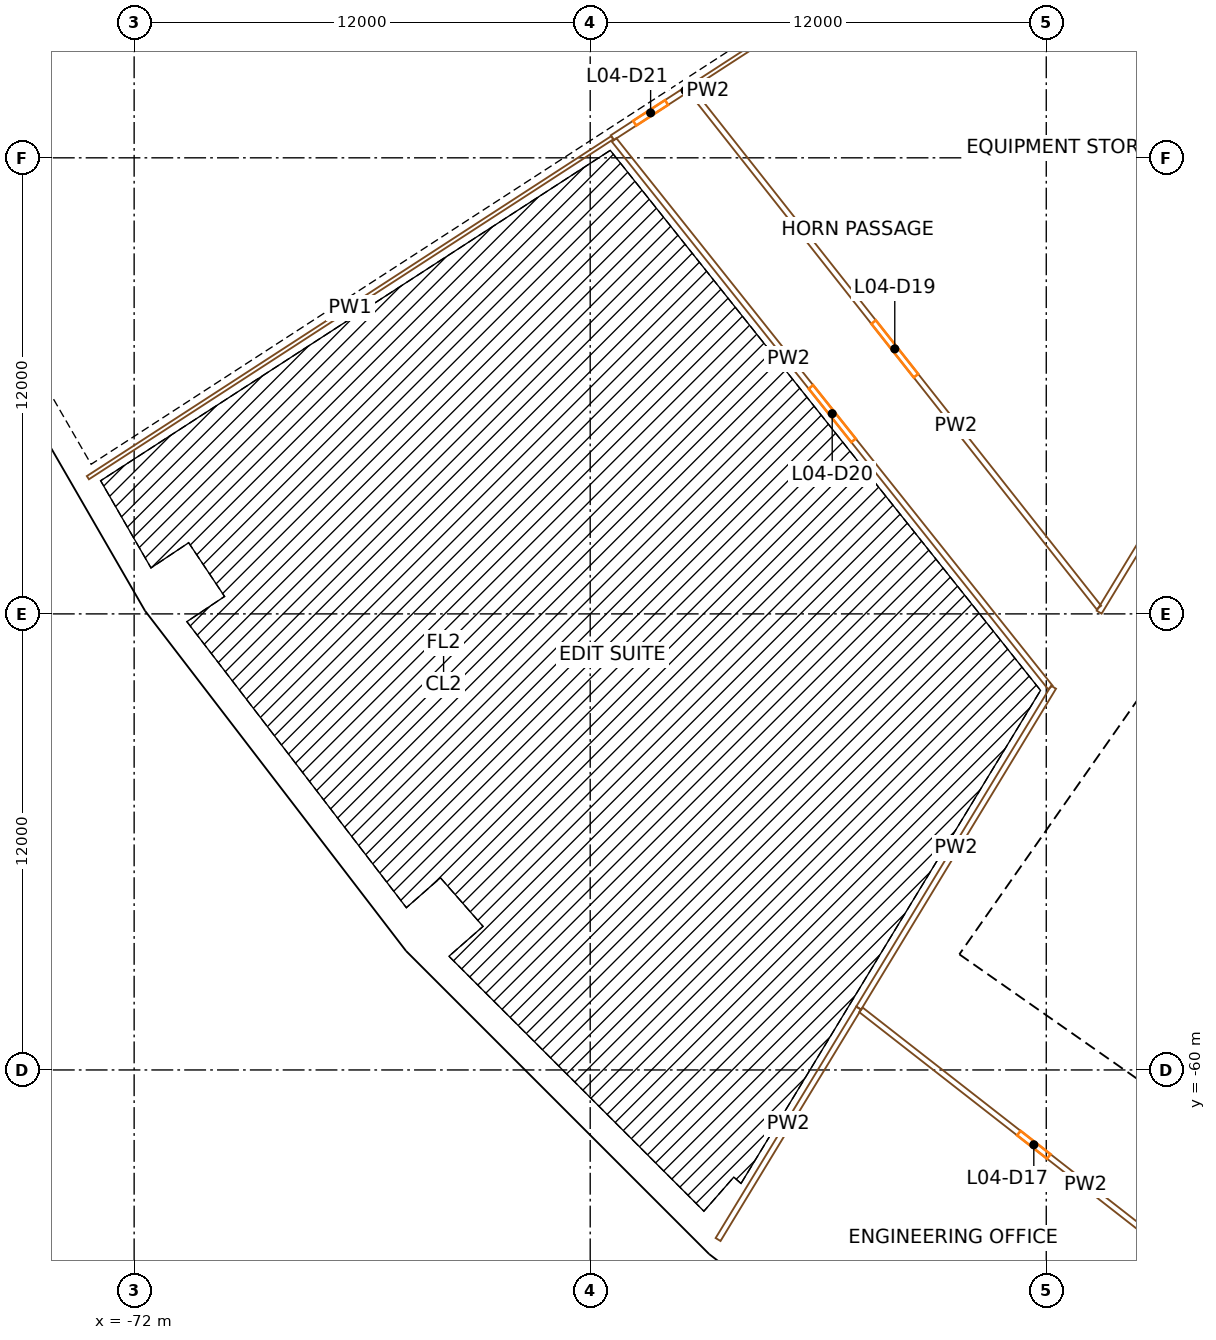
"""IFC4 building model, lengths in metres.
Left out: names, types, materials, properties, quantities, classifications, styles, units other than length and angle.
Written with IfcOpenShell. Run it as: python <this file> out.ifc"""

import sys

from ifc_helpers import new_model, si_unit, direction, frame, frame_2d, origin, origin_2d, place, context, subcontext, project, spatial, rectangle, extrude, element, fill, save


model = new_model("IFC4")
c1 = context("Model", 3, precision=1e-05, world=origin(), true_north=direction((0.0, 1.0)))
c2 = subcontext(c1, "Body", "Model", "MODEL_VIEW")
j1 = project(units=[si_unit("LENGTHUNIT", "METRE"), si_unit("PLANEANGLEUNIT", "RADIAN")], contexts=[c1])
p1 = place(None, origin())
s1 = spatial("IfcSite", under=j1, at=p1, CompositionType="ELEMENT")
p2 = place(p1, origin())
s2 = spatial("IfcBuilding", under=s1, at=p2, CompositionType="ELEMENT")
p3 = place(p2, frame((0.0, 0.0, 31.5)))
s3 = spatial("IfcBuildingStorey", under=s2, at=p3, CompositionType="ELEMENT", Elevation=31.5)
for number, where, z_axis, x_axis in (
    (1, (-69.732, -34.388, 0.0), (0.0, 0.0, 1.0), (0.442, -0.897, 0.0)),
    (2, (-48.433, -32.362, 0.0), (0.0, 0.0, 1.0), (0.556, -0.831, 0.0)),
    (3, (-64.647, -43.196, 0.0), (0.0, 0.0, 1.0), (0.556, -0.831, 0.0)),
):
    element("IfcColumn", number, at=place(p3, frame(where, z_axis=z_axis, x_axis=x_axis)), inside=s3, PredefinedType="COLUMN", context=c2, shape_type="SweptSolid", body=[
        extrude(rectangle(XDim=1.4, YDim=1.8, at=origin_2d()), origin(), (0.0, 0.0, 1.0), 4.5),
    ])
p4 = place(p3, frame((-70.883, -47.362, 0.0), z_axis=(0.0, 0.0, 1.0), x_axis=(0.55557023302, -0.831469612303, 0.0)))
e4 = element("IfcColumn", 4, at=p4, inside=s3, PredefinedType="COLUMN", context=c2, shape_type="SweptSolid", body=[
    extrude(rectangle(XDim=1.1, YDim=1.3, at=origin_2d()), origin(), (0.0, 0.0, 1.0), 4.5),
])
p5 = place(p3, frame((-58.456, -51.264, 0.0), z_axis=(0.0, 0.0, 1.0), x_axis=(0.6593458151, -0.751839807479, 0.0)))
e5 = element("IfcColumn", 5, at=p5, inside=s3, PredefinedType="COLUMN", context=c2, shape_type="SweptSolid", body=[
    extrude(rectangle(XDim=1.4, YDim=1.8, at=origin_2d()), origin(), (0.0, 0.0, 1.0), 4.5),
])
p6 = place(p3, frame((-64.094, -56.209, 0.0), z_axis=(0.0, 0.0, 1.0), x_axis=(0.6593458151, -0.751839807479, 0.0)))
e6 = element("IfcColumn", 6, at=p6, inside=s3, PredefinedType="COLUMN", context=c2, shape_type="SweptSolid", body=[
    extrude(rectangle(XDim=1.1, YDim=1.3, at=origin_2d()), origin(), (0.0, 0.0, 1.0), 4.5),
])
p7 = place(p3, frame((-51.264, -58.456, 0.0), z_axis=(0.0, 0.0, 1.0), x_axis=(0.751839807479, -0.6593458151, 0.0)))
e7 = element("IfcColumn", 7, at=p7, inside=s3, PredefinedType="COLUMN", context=c2, shape_type="SweptSolid", body=[
    extrude(rectangle(XDim=1.4, YDim=1.8, at=origin_2d()), origin(), (0.0, 0.0, 1.0), 4.5),
])
p8 = place(p3, frame((-56.209, -64.094, 0.0), z_axis=(0.0, 0.0, 1.0), x_axis=(0.751839807479, -0.6593458151, 0.0)))
e8 = element("IfcColumn", 8, at=p8, inside=s3, PredefinedType="COLUMN", context=c2, shape_type="SweptSolid", body=[
    extrude(rectangle(XDim=1.1, YDim=1.3, at=origin_2d()), origin(), (0.0, 0.0, 1.0), 4.5),
])
p9 = place(p3, frame((-49.779, -57.191, 0.0), z_axis=(0.0, 0.0, 1.0), x_axis=(0.573577477574, 0.819151315216, 0.0)))
e9 = element("IfcWall", 9, at=p9, inside=s3, PredefinedType="SHEAR", context=c2, shape_type="SweptSolid", body=[
    extrude(rectangle(XDim=14.8, YDim=0.9, at=frame_2d((7.4, 0.0))), origin(), (0.0, 0.0, 1.0), 4.1),
])
p10 = place(p9, frame((6.7, 0.0, 0.0)))
e10 = element("IfcOpeningElement", 10, at=p10, cuts=e9, PredefinedType="OPENING", context=c2, shape_type="SweptSolid", body=[
    extrude(rectangle(XDim=1.4, YDim=2.1, at=frame_2d((0.7, 1.05))), frame((0.0, 0.46, 0.0), z_axis=(0.0, -1.0, 0.0), x_axis=(1.0, 0.0, 0.0)), (0.0, 0.0, 1.0), 0.92),
])
p11 = place(p3, frame((-36.827, -65.71, 0.0), z_axis=(0.0, 0.0, 1.0), x_axis=(-0.819153391756, 0.573574511963, 0.0)))
e11 = element("IfcWall", 11, at=p11, inside=s3, PredefinedType="SHEAR", context=c2, shape_type="SweptSolid", body=[
    extrude(rectangle(XDim=15.045, YDim=0.9, at=frame_2d((7.523, 0.0))), origin(), (0.0, 0.0, 1.0), 4.1),
])
p12 = place(p11, frame((0.6, 0.0, 0.0)))
e12 = element("IfcOpeningElement", 12, at=p12, cuts=e11, PredefinedType="OPENING", context=c2, shape_type="SweptSolid", body=[
    extrude(rectangle(XDim=1.0, YDim=2.1, at=frame_2d((0.5, 1.05))), frame((0.0, 0.46, 0.0), z_axis=(0.0, -1.0, 0.0), x_axis=(1.0, 0.0, 0.0)), (0.0, 0.0, 1.0), 0.92),
])
p13 = place(p11, frame((3.275, 0.0, 0.0)))
e13 = element("IfcOpeningElement", 13, at=p13, cuts=e11, PredefinedType="OPENING", context=c2, shape_type="SweptSolid", body=[
    extrude(rectangle(XDim=1.0, YDim=2.1, at=frame_2d((0.5, 1.05))), frame((0.0, 0.46, 0.0), z_axis=(0.0, -1.0, 0.0), x_axis=(1.0, 0.0, 0.0)), (0.0, 0.0, 1.0), 0.92),
])
p14 = place(p11, frame((6.175, 0.0, 0.0)))
e14 = element("IfcOpeningElement", 14, at=p14, cuts=e11, PredefinedType="OPENING", context=c2, shape_type="SweptSolid", body=[
    extrude(rectangle(XDim=1.0, YDim=2.1, at=frame_2d((0.5, 1.05))), frame((0.0, 0.46, 0.0), z_axis=(0.0, -1.0, 0.0), x_axis=(1.0, 0.0, 0.0)), (0.0, 0.0, 1.0), 0.92),
])
p15 = place(p11, frame((13.495, 0.0, 0.0)))
e15 = element("IfcOpeningElement", 15, at=p15, cuts=e11, PredefinedType="OPENING", context=c2, shape_type="SweptSolid", body=[
    extrude(rectangle(XDim=1.1, YDim=2.1, at=frame_2d((0.55, 1.05))), frame((0.0, 0.46, 0.0), z_axis=(0.0, -1.0, 0.0), x_axis=(1.0, 0.0, 0.0)), (0.0, 0.0, 1.0), 0.92),
])
p16 = place(p3, frame((-41.262, -57.661, 0.0), z_axis=(0.0, 0.0, 1.0), x_axis=(-0.819164398642, 0.573558792102, 0.0)))
e16 = element("IfcWall", 16, at=p16, inside=s3, PredefinedType="SOLIDWALL", context=c2, shape_type="SweptSolid", body=[
    extrude(rectangle(XDim=6.795, YDim=0.3, at=frame_2d((3.397, 0.0))), origin(), (0.0, 0.0, 1.0), 4.1),
])
p17 = place(p16, frame((5.32, 0.0, 0.0)))
e17 = element("IfcOpeningElement", 17, at=p17, cuts=e16, PredefinedType="OPENING", context=c2, shape_type="SweptSolid", body=[
    extrude(rectangle(XDim=1.1, YDim=2.1, at=frame_2d((0.55, 1.05))), frame((0.0, 0.16, 0.0), z_axis=(0.0, -1.0, 0.0), x_axis=(1.0, 0.0, 0.0)), (0.0, 0.0, 1.0), 0.32),
])
p18 = place(p3, frame((-77.168, -38.022, 0.0), z_axis=(0.0, 0.0, 1.0), x_axis=(0.500001430823, -0.866024577697, 0.0)))
e18 = element("IfcWall", 18, at=p18, inside=s3, PredefinedType="SOLIDWALL", context=c2, shape_type="SweptSolid", body=[
    extrude(rectangle(XDim=11.312, YDim=0.45, at=frame_2d((5.656, 0.0))), origin(), (0.0, 0.0, 1.0), 3.2),
])
p19 = place(p18, frame((4.006, 0.0, 0.9)))
e19 = element("IfcOpeningElement", 19, at=p19, cuts=e18, PredefinedType="OPENING", context=c2, shape_type="SweptSolid", body=[
    extrude(rectangle(XDim=1.2, YDim=2.15, at=frame_2d((0.6, 1.075))), frame((0.0, 0.235, 0.0), z_axis=(0.0, -1.0, 0.0), x_axis=(1.0, 0.0, 0.0)), (0.0, 0.0, 1.0), 0.47),
])
p20 = place(p18, frame((6.106, 0.0, 0.9)))
e20 = element("IfcOpeningElement", 20, at=p20, cuts=e18, PredefinedType="OPENING", context=c2, shape_type="SweptSolid", body=[
    extrude(rectangle(XDim=1.2, YDim=2.15, at=frame_2d((0.6, 1.075))), frame((0.0, 0.235, 0.0), z_axis=(0.0, -1.0, 0.0), x_axis=(1.0, 0.0, 0.0)), (0.0, 0.0, 1.0), 0.47),
])
p21 = place(p3, frame((-71.491, -47.839, 0.0), z_axis=(0.0, 0.0, 1.0), x_axis=(0.608758773695, -0.793355377778, 0.0)))
e21 = element("IfcWall", 21, at=p21, inside=s3, PredefinedType="SOLIDWALL", context=c2, shape_type="SweptSolid", body=[
    extrude(rectangle(XDim=11.135, YDim=0.45, at=frame_2d((5.567, 0.0))), origin(), (0.0, 0.0, 1.0), 3.2),
])
p22 = place(p21, frame((3.917, 0.0, 0.9)))
e22 = element("IfcOpeningElement", 22, at=p22, cuts=e21, PredefinedType="OPENING", context=c2, shape_type="SweptSolid", body=[
    extrude(rectangle(XDim=1.2, YDim=2.15, at=frame_2d((0.6, 1.075))), frame((0.0, 0.235, 0.0), z_axis=(0.0, -1.0, 0.0), x_axis=(1.0, 0.0, 0.0)), (0.0, 0.0, 1.0), 0.47),
])
p23 = place(p21, frame((6.017, 0.0, 0.9)))
e23 = element("IfcOpeningElement", 23, at=p23, cuts=e21, PredefinedType="OPENING", context=c2, shape_type="SweptSolid", body=[
    extrude(rectangle(XDim=1.2, YDim=2.15, at=frame_2d((0.6, 1.075))), frame((0.0, 0.235, 0.0), z_axis=(0.0, -1.0, 0.0), x_axis=(1.0, 0.0, 0.0)), (0.0, 0.0, 1.0), 0.47),
])
p24 = place(p3, frame((-64.698, -56.699, 0.0), z_axis=(0.0, 0.0, 1.0), x_axis=(0.707106781187, -0.707106781187, 0.0)))
e24 = element("IfcWall", 24, at=p24, inside=s3, PredefinedType="SOLIDWALL", context=c2, shape_type="SweptSolid", body=[
    extrude(rectangle(XDim=11.312, YDim=0.45, at=frame_2d((5.656, 0.0))), origin(), (0.0, 0.0, 1.0), 3.2),
])
p25 = place(p24, frame((4.006, 0.0, 0.9)))
e25 = element("IfcOpeningElement", 25, at=p25, cuts=e24, PredefinedType="OPENING", context=c2, shape_type="SweptSolid", body=[
    extrude(rectangle(XDim=1.2, YDim=2.15, at=frame_2d((0.6, 1.075))), frame((0.0, 0.235, 0.0), z_axis=(0.0, -1.0, 0.0), x_axis=(1.0, 0.0, 0.0)), (0.0, 0.0, 1.0), 0.47),
])
p26 = place(p24, frame((6.106, 0.0, 0.9)))
e26 = element("IfcOpeningElement", 26, at=p26, cuts=e24, PredefinedType="OPENING", context=c2, shape_type="SweptSolid", body=[
    extrude(rectangle(XDim=1.2, YDim=2.15, at=frame_2d((0.6, 1.075))), frame((0.0, 0.235, 0.0), z_axis=(0.0, -1.0, 0.0), x_axis=(1.0, 0.0, 0.0)), (0.0, 0.0, 1.0), 0.47),
])
p27 = place(p3, frame((-56.673, -64.713, 0.0), z_axis=(0.0, 0.0, 1.0), x_axis=(0.793355377778, -0.608758773695, 0.0)))
e27 = element("IfcWall", 27, at=p27, inside=s3, PredefinedType="SOLIDWALL", context=c2, shape_type="SweptSolid", body=[
    extrude(rectangle(XDim=11.135, YDim=0.45, at=frame_2d((5.567, 0.0))), origin(), (0.0, 0.0, 1.0), 3.2),
])
p28 = place(p27, frame((3.917, 0.0, 0.9)))
e28 = element("IfcOpeningElement", 28, at=p28, cuts=e27, PredefinedType="OPENING", context=c2, shape_type="SweptSolid", body=[
    extrude(rectangle(XDim=1.2, YDim=2.15, at=frame_2d((0.6, 1.075))), frame((0.0, 0.235, 0.0), z_axis=(0.0, -1.0, 0.0), x_axis=(1.0, 0.0, 0.0)), (0.0, 0.0, 1.0), 0.47),
])
p29 = place(p27, frame((6.017, 0.0, 0.9)))
e29 = element("IfcOpeningElement", 29, at=p29, cuts=e27, PredefinedType="OPENING", context=c2, shape_type="SweptSolid", body=[
    extrude(rectangle(XDim=1.2, YDim=2.15, at=frame_2d((0.6, 1.075))), frame((0.0, 0.235, 0.0), z_axis=(0.0, -1.0, 0.0), x_axis=(1.0, 0.0, 0.0)), (0.0, 0.0, 1.0), 0.47),
])
p30 = place(p3, frame((-73.217, -44.416, 0.0), z_axis=(0.0, 0.0, 1.0), x_axis=(0.839098650594, 0.543979277703, 0.0)))
e30 = element("IfcWall", 30, at=p30, inside=s3, PredefinedType="PARTITIONING", context=c2, shape_type="SweptSolid", body=[
    extrude(rectangle(XDim=16.445, YDim=0.1, at=frame_2d((8.223, 0.0))), origin(), (0.0, 0.0, 1.0), 3.1),
])
p31 = place(p3, frame((-59.418, -35.47, 0.0), z_axis=(0.0, 0.0, 1.0), x_axis=(0.839081673018, 0.544005465051, 0.0)))
e31 = element("IfcWall", 31, at=p31, inside=s3, PredefinedType="PARTITIONING", context=c2, shape_type="SweptSolid", body=[
    extrude(rectangle(XDim=2.402, YDim=0.15, at=frame_2d((1.201, 0.0))), origin(), (0.0, 0.0, 1.0), 3.1),
])
p32 = place(p31, frame((0.701, 0.0, 0.0)))
e32 = element("IfcOpeningElement", 32, at=p32, cuts=e31, PredefinedType="OPENING", context=c2, shape_type="SweptSolid", body=[
    extrude(rectangle(XDim=1.0, YDim=2.1, at=frame_2d((0.5, 1.05))), frame((0.0, 0.085, 0.0), z_axis=(0.0, -1.0, 0.0), x_axis=(1.0, 0.0, 0.0)), (0.0, 0.0, 1.0), 0.17),
])
p33 = place(p3, frame((-57.403, -34.164, 0.0), z_axis=(0.0, 0.0, 1.0), x_axis=(0.83909708633, 0.543981690604, 0.0)))
e33 = element("IfcWall", 33, at=p33, inside=s3, PredefinedType="PARTITIONING", context=c2, shape_type="SweptSolid", body=[
    extrude(rectangle(XDim=16.723, YDim=0.1, at=frame_2d((8.362, 0.0))), origin(), (0.0, 0.0, 1.0), 3.1),
])
p34 = place(p3, frame((-52.936, -58.372, 0.0), z_axis=(0.0, 0.0, 1.0), x_axis=(-0.519148894699, -0.854683815883, 0.0)))
e34 = element("IfcWall", 34, at=p34, inside=s3, PredefinedType="PARTITIONING", context=c2, shape_type="SweptSolid", body=[
    extrude(rectangle(XDim=7.125, YDim=0.15, at=frame_2d((3.563, 0.0))), origin(), (0.0, 0.0, 1.0), 3.1),
])
p35 = place(p3, frame((-43.779, -65.52, 0.0), z_axis=(0.0, 0.0, 1.0), x_axis=(-0.788255221118, 0.615348443063, 0.0)))
e35 = element("IfcWall", 35, at=p35, inside=s3, PredefinedType="PARTITIONING", context=c2, shape_type="SweptSolid", body=[
    extrude(rectangle(XDim=11.542, YDim=0.15, at=frame_2d((5.771, 0.0))), origin(), (0.0, 0.0, 1.0), 3.1),
])
p36 = place(p35, frame((5.271, 0.0, 0.0)))
e36 = element("IfcOpeningElement", 36, at=p36, cuts=e35, PredefinedType="OPENING", context=c2, shape_type="SweptSolid", body=[
    extrude(rectangle(XDim=1.0, YDim=2.1, at=frame_2d((0.5, 1.05))), frame((0.0, 0.085, 0.0), z_axis=(0.0, -1.0, 0.0), x_axis=(1.0, 0.0, 0.0)), (0.0, 0.0, 1.0), 0.17),
])
p37 = place(p3, frame((-47.893, -49.935, 0.0), z_axis=(0.0, 0.0, 1.0), x_axis=(-0.623151769875, 0.782100934472, 0.0)))
e37 = element("IfcWall", 37, at=p37, inside=s3, PredefinedType="PARTITIONING", context=c2, shape_type="SweptSolid", body=[
    extrude(rectangle(XDim=18.419, YDim=0.15, at=frame_2d((9.21, 0.0))), origin(), (0.0, 0.0, 1.0), 3.1),
])
p38 = place(p37, frame((8.31, 0.0, 0.0)))
e38 = element("IfcOpeningElement", 38, at=p38, cuts=e37, PredefinedType="OPENING", context=c2, shape_type="SweptSolid", body=[
    extrude(rectangle(XDim=1.8, YDim=2.1, at=frame_2d((0.9, 1.05))), frame((0.0, 0.085, 0.0), z_axis=(0.0, -1.0, 0.0), x_axis=(1.0, 0.0, 0.0)), (0.0, 0.0, 1.0), 0.17),
])
p39 = place(p3, frame((-47.808, -49.929, 0.0), z_axis=(0.0, 0.0, 1.0), x_axis=(-0.519169679695, -0.854671190392, 0.0)))
e39 = element("IfcWall", 39, at=p39, inside=s3, PredefinedType="PARTITIONING", context=c2, shape_type="SweptSolid", body=[
    extrude(rectangle(XDim=9.878, YDim=0.15, at=frame_2d((4.939, 0.0))), origin(), (0.0, 0.0, 1.0), 3.1),
])
p40 = place(p3, frame((-57.356, -34.223, 0.0), z_axis=(0.0, 0.0, 1.0), x_axis=(0.619510500346, -0.784988369316, 0.0)))
e40 = element("IfcWall", 40, at=p40, inside=s3, PredefinedType="PARTITIONING", context=c2, shape_type="SweptSolid", body=[
    extrude(rectangle(XDim=17.337, YDim=0.15, at=frame_2d((8.668, 0.0))), origin(), (0.0, 0.0, 1.0), 3.1),
])
p41 = place(p40, frame((7.769, 0.0, 0.0)))
e41 = element("IfcOpeningElement", 41, at=p41, cuts=e40, PredefinedType="OPENING", context=c2, shape_type="SweptSolid", body=[
    extrude(rectangle(XDim=1.8, YDim=2.1, at=frame_2d((0.9, 1.05))), frame((0.0, 0.085, 0.0), z_axis=(0.0, -1.0, 0.0), x_axis=(1.0, 0.0, 0.0)), (0.0, 0.0, 1.0), 0.17),
])
p42 = place(p3, frame((-41.648, -39.789, 0.0), z_axis=(0.0, 0.0, 1.0), x_axis=(-0.519144162426, -0.854686690325, 0.0)))
e42 = element("IfcWall", 42, at=p42, inside=s3, PredefinedType="PARTITIONING", context=c2, shape_type="SweptSolid", body=[
    extrude(rectangle(XDim=9.554, YDim=0.15, at=frame_2d((4.777, 0.0))), origin(), (0.0, 0.0, 1.0), 3.1),
])
p43 = place(p10, origin())
e43 = element("IfcDoor", 43, at=p43, inside=s3, OperationType="DOUBLE_DOOR_SINGLE_SWING", PredefinedType="DOOR", context=c2, shape_type="SweptSolid", body=[
    extrude(rectangle(XDim=1.4, YDim=2.1, at=frame_2d((0.7, 1.05))), frame((0.0, 0.025, 0.0), z_axis=(0.0, -1.0, 0.0), x_axis=(1.0, 0.0, 0.0)), (0.0, 0.0, 1.0), 0.05),
])
fill(e10, e43)
p44 = place(p15, origin())
e44 = element("IfcDoor", 44, at=p44, inside=s3, OperationType="SINGLE_SWING_LEFT", PredefinedType="DOOR", context=c2, shape_type="SweptSolid", body=[
    extrude(rectangle(XDim=1.1, YDim=2.1, at=frame_2d((0.55, 1.05))), frame((0.0, 0.025, 0.0), z_axis=(0.0, -1.0, 0.0), x_axis=(1.0, 0.0, 0.0)), (0.0, 0.0, 1.0), 0.05),
])
fill(e15, e44)
p45 = place(p17, origin())
e45 = element("IfcDoor", 45, at=p45, inside=s3, OperationType="SINGLE_SWING_LEFT", PredefinedType="DOOR", context=c2, shape_type="SweptSolid", body=[
    extrude(rectangle(XDim=1.1, YDim=2.1, at=frame_2d((0.55, 1.05))), frame((0.0, 0.025, 0.0), z_axis=(0.0, -1.0, 0.0), x_axis=(1.0, 0.0, 0.0)), (0.0, 0.0, 1.0), 0.05),
])
fill(e17, e45)
p46 = place(p20, origin())
e46 = element("IfcWindow", 46, at=p46, inside=s3, PartitioningType="SINGLE_PANEL", PredefinedType="WINDOW", context=c2, shape_type="SweptSolid", body=[
    extrude(rectangle(XDim=1.2, YDim=2.15, at=frame_2d((0.6, 1.075))), frame((0.0, 0.03, 0.0), z_axis=(0.0, -1.0, 0.0), x_axis=(1.0, 0.0, 0.0)), (0.0, 0.0, 1.0), 0.06),
])
fill(e20, e46)
p47 = place(p22, origin())
e47 = element("IfcWindow", 47, at=p47, inside=s3, PartitioningType="SINGLE_PANEL", PredefinedType="WINDOW", context=c2, shape_type="SweptSolid", body=[
    extrude(rectangle(XDim=1.2, YDim=2.15, at=frame_2d((0.6, 1.075))), frame((0.0, 0.03, 0.0), z_axis=(0.0, -1.0, 0.0), x_axis=(1.0, 0.0, 0.0)), (0.0, 0.0, 1.0), 0.06),
])
fill(e22, e47)
p48 = place(p23, origin())
e48 = element("IfcWindow", 48, at=p48, inside=s3, PartitioningType="SINGLE_PANEL", PredefinedType="WINDOW", context=c2, shape_type="SweptSolid", body=[
    extrude(rectangle(XDim=1.2, YDim=2.15, at=frame_2d((0.6, 1.075))), frame((0.0, 0.03, 0.0), z_axis=(0.0, -1.0, 0.0), x_axis=(1.0, 0.0, 0.0)), (0.0, 0.0, 1.0), 0.06),
])
fill(e23, e48)
p49 = place(p25, origin())
e49 = element("IfcWindow", 49, at=p49, inside=s3, PartitioningType="SINGLE_PANEL", PredefinedType="WINDOW", context=c2, shape_type="SweptSolid", body=[
    extrude(rectangle(XDim=1.2, YDim=2.15, at=frame_2d((0.6, 1.075))), frame((0.0, 0.03, 0.0), z_axis=(0.0, -1.0, 0.0), x_axis=(1.0, 0.0, 0.0)), (0.0, 0.0, 1.0), 0.06),
])
fill(e25, e49)
p50 = place(p26, origin())
e50 = element("IfcWindow", 50, at=p50, inside=s3, PartitioningType="SINGLE_PANEL", PredefinedType="WINDOW", context=c2, shape_type="SweptSolid", body=[
    extrude(rectangle(XDim=1.2, YDim=2.15, at=frame_2d((0.6, 1.075))), frame((0.0, 0.03, 0.0), z_axis=(0.0, -1.0, 0.0), x_axis=(1.0, 0.0, 0.0)), (0.0, 0.0, 1.0), 0.06),
])
fill(e26, e50)
p51 = place(p36, origin())
e51 = element("IfcDoor", 51, at=p51, inside=s3, OperationType="SINGLE_SWING_RIGHT", PredefinedType="DOOR", context=c2, shape_type="SweptSolid", body=[
    extrude(rectangle(XDim=1.0, YDim=2.1, at=frame_2d((0.5, 1.05))), frame((0.0, 0.025, 0.0), z_axis=(0.0, -1.0, 0.0), x_axis=(1.0, 0.0, 0.0)), (0.0, 0.0, 1.0), 0.05),
])
fill(e36, e51)
p52 = place(p41, origin())
e52 = element("IfcDoor", 52, at=p52, inside=s3, OperationType="DOUBLE_DOOR_SINGLE_SWING", PredefinedType="DOOR", context=c2, shape_type="SweptSolid", body=[
    extrude(rectangle(XDim=1.8, YDim=2.1, at=frame_2d((0.9, 1.05))), frame((0.0, 0.025, 0.0), z_axis=(0.0, -1.0, 0.0), x_axis=(1.0, 0.0, 0.0)), (0.0, 0.0, 1.0), 0.05),
])
fill(e41, e52)
p53 = place(p38, origin())
e53 = element("IfcDoor", 53, at=p53, inside=s3, OperationType="DOUBLE_DOOR_SINGLE_SWING", PredefinedType="DOOR", context=c2, shape_type="SweptSolid", body=[
    extrude(rectangle(XDim=1.8, YDim=2.1, at=frame_2d((0.9, 1.05))), frame((0.0, 0.025, 0.0), z_axis=(0.0, -1.0, 0.0), x_axis=(1.0, 0.0, 0.0)), (0.0, 0.0, 1.0), 0.05),
])
fill(e38, e53)
p54 = place(p32, origin())
e54 = element("IfcDoor", 54, at=p54, inside=s3, OperationType="SINGLE_SWING_RIGHT", PredefinedType="DOOR", context=c2, shape_type="SweptSolid", body=[
    extrude(rectangle(XDim=1.0, YDim=2.1, at=frame_2d((0.5, 1.05))), frame((0.0, 0.025, 0.0), z_axis=(0.0, -1.0, 0.0), x_axis=(1.0, 0.0, 0.0)), (0.0, 0.0, 1.0), 0.05),
])
fill(e32, e54)
save(model, sys.argv[1])
